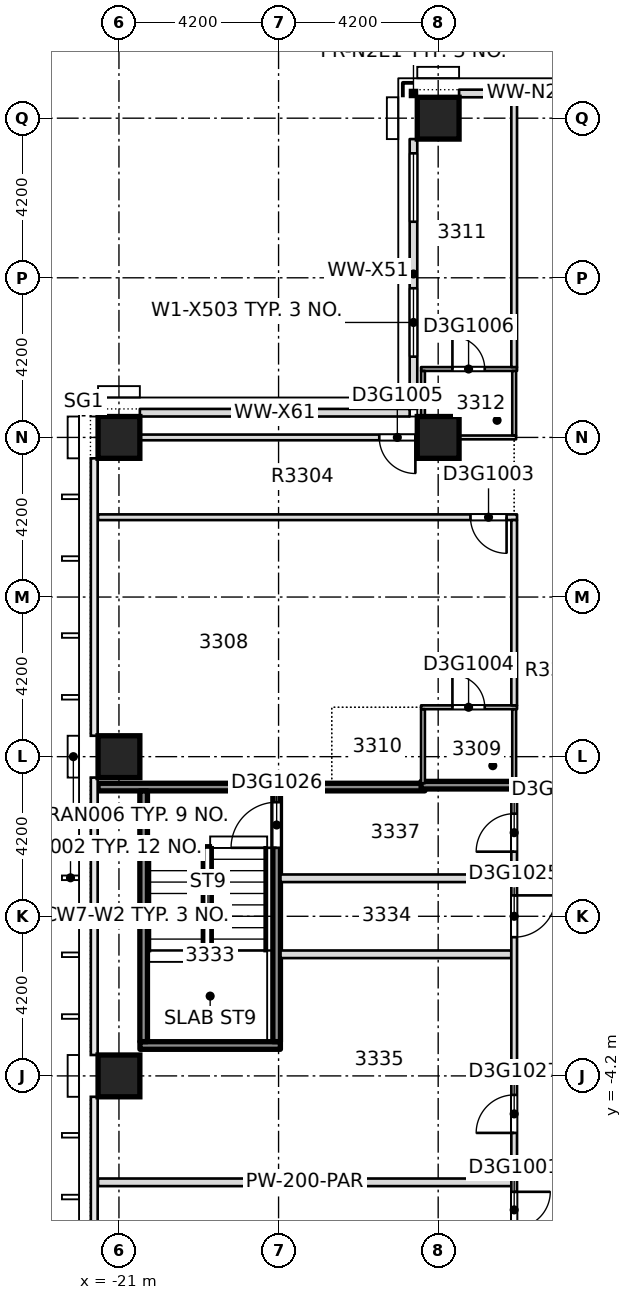
"""IFC4 building model, lengths in metres.
Left out: names, types, materials, properties, quantities, classifications, styles, units other than length and angle.
Written with IfcOpenShell. Run it as: python <this file> out.ifc"""

import sys

from ifc_helpers import new_model, si_unit, direction, frame, frame_2d, origin, origin_2d, place, context, subcontext, project, spatial, rectangle, extrude, element, fill, save


model = new_model("IFC4")
c1 = context("Model", 3, precision=1e-05, world=origin(), true_north=direction((0.0, 1.0)))
c2 = subcontext(c1, "Body", "Model", "MODEL_VIEW")
j1 = project(units=[si_unit("LENGTHUNIT", "METRE"), si_unit("PLANEANGLEUNIT", "RADIAN")], contexts=[c1])
p1 = place(None, origin())
s1 = spatial("IfcSite", under=j1, at=p1, CompositionType="ELEMENT")
p2 = place(p1, origin())
s2 = spatial("IfcBuilding", under=s1, at=p2, CompositionType="ELEMENT")
p3 = place(p2, frame((0.0, 0.0, 133.1)))
s3 = spatial("IfcBuildingStorey", under=s2, at=p3, CompositionType="ELEMENT", Elevation=133.1)
for number, where, z_axis, x_axis in (
    (1, (-21.0, -4.2, -0.4), (0.0, 0.0, 1.0), (1.0, 0.0, 0.0)),
    (2, (-21.0, 4.2, -0.4), (0.0, 0.0, 1.0), (1.0, 0.0, 0.0)),
    (3, (-21.0, 12.6, -0.4), (0.0, 0.0, 1.0), (1.0, 0.0, 0.0)),
    (4, (-12.6, 12.6, -0.4), (0.0, 0.0, 1.0), (1.0, 0.0, 0.0)),
    (5, (-12.6, 21.0, -0.4), (0.0, 0.0, 1.0), (1.0, 0.0, 0.0)),
):
    element("IfcColumn", number, at=place(p3, frame(where, z_axis=z_axis, x_axis=x_axis)), inside=s3, PredefinedType="COLUMN", context=c2, shape_type="SweptSolid", body=[
        extrude(rectangle(XDim=1.1, YDim=1.1, at=origin_2d()), origin(), (0.0, 0.0, 1.0), 3.45),
    ])
p4 = place(p3, frame((-21.55, -7.0, 0.0), z_axis=(0.0, 0.0, 1.0), x_axis=(1.0, 0.0, 0.0)))
e6 = element("IfcWall", 6, at=p4, inside=s3, PredefinedType="PARTITIONING", context=c2, shape_type="SweptSolid", body=[
    extrude(rectangle(XDim=10.875, YDim=0.2, at=frame_2d((5.438, 0.0))), origin(), (0.0, 0.0, 1.0), 3.05),
])
p5 = place(p3, frame((-20.448, -3.4, 0.0), z_axis=(0.0, 0.0, 1.0), x_axis=(1.0, 0.0, 0.0)))
e7 = element("IfcWall", 7, at=p5, inside=s3, PredefinedType="SOLIDWALL", context=c2, shape_type="SweptSolid", body=[
    extrude(rectangle(XDim=3.696, YDim=0.2, at=frame_2d((1.848, 0.0))), origin(), (0.0, 0.0, 1.0), 3.05),
])
p6 = place(p3, frame((-16.748, -1.0, 0.0), z_axis=(0.0, 0.0, 1.0), x_axis=(1.0, 0.0, 0.0)))
e8 = element("IfcWall", 8, at=p6, inside=s3, PredefinedType="PARTITIONING", context=c2, shape_type="SweptSolid", body=[
    extrude(rectangle(XDim=6.071, YDim=0.2, at=frame_2d((3.036, 0.0))), origin(), (0.0, 0.0, 1.0), 3.05),
])
p7 = place(p3, frame((-16.75, 1.0, 0.0), z_axis=(0.0, 0.0, 1.0), x_axis=(1.0, 0.0, 0.0)))
e9 = element("IfcWall", 9, at=p7, inside=s3, PredefinedType="PARTITIONING", context=c2, shape_type="SweptSolid", body=[
    extrude(rectangle(XDim=6.075, YDim=0.2, at=frame_2d((3.038, 0.0))), origin(), (0.0, 0.0, 1.0), 3.05),
])
p8 = place(p3, frame((-21.55, 3.4, 0.0), z_axis=(0.0, 0.0, 1.0), x_axis=(1.0, 0.0, 0.0)))
e10 = element("IfcWall", 10, at=p8, inside=s3, PredefinedType="SOLIDWALL", context=c2, shape_type="SweptSolid", body=[
    extrude(rectangle(XDim=8.6, YDim=0.2, at=frame_2d((4.3, 0.0))), origin(), (0.0, 0.0, 1.0), 3.05),
])
p9 = place(p3, frame((-13.05, 3.45, 0.0), z_axis=(0.0, 0.0, 1.0), x_axis=(1.0, 0.0, 0.0)))
e11 = element("IfcWall", 11, at=p9, inside=s3, PredefinedType="SOLIDWALL", context=c2, shape_type="SweptSolid", body=[
    extrude(rectangle(XDim=2.525, YDim=0.2, at=frame_2d((1.263, 0.0))), origin(), (0.0, 0.0, 1.0), 3.05),
])
p10 = place(p3, frame((-13.05, 5.5, 0.0), z_axis=(0.0, 0.0, 1.0), x_axis=(1.0, 0.0, 0.0)))
e12 = element("IfcWall", 12, at=p10, inside=s3, PredefinedType="PARTITIONING", context=c2, shape_type="SweptSolid", body=[
    extrude(rectangle(XDim=2.525, YDim=0.1, at=frame_2d((1.263, 0.0))), origin(), (0.0, 0.0, 1.0), 3.05),
])
p11 = place(p10, frame((0.825, 0.0, 0.0)))
e13 = element("IfcOpeningElement", 13, at=p11, cuts=e12, PredefinedType="OPENING", context=c2, shape_type="SweptSolid", body=[
    extrude(rectangle(XDim=0.85, YDim=2.1, at=frame_2d((0.425, 1.05))), frame((0.0, 0.06, 0.0), z_axis=(0.0, -1.0, 0.0), x_axis=(1.0, 0.0, 0.0)), (0.0, 0.0, 1.0), 0.12),
])
p12 = place(p3, frame((-21.55, 10.5, 0.0), z_axis=(0.0, 0.0, 1.0), x_axis=(1.0, 0.0, 0.0)))
e14 = element("IfcWall", 14, at=p12, inside=s3, PredefinedType="PARTITIONING", context=c2, shape_type="SweptSolid", body=[
    extrude(rectangle(XDim=11.025, YDim=0.15, at=frame_2d((5.513, 0.0))), origin(), (0.0, 0.0, 1.0), 3.05),
])
p13 = place(p12, frame((9.8, 0.0, 0.0)))
e15 = element("IfcOpeningElement", 15, at=p13, cuts=e14, PredefinedType="OPENING", context=c2, shape_type="SweptSolid", body=[
    extrude(rectangle(XDim=0.95, YDim=2.1, at=frame_2d((0.475, 1.05))), frame((0.0, 0.085, 0.0), z_axis=(0.0, -1.0, 0.0), x_axis=(1.0, 0.0, 0.0)), (0.0, 0.0, 1.0), 0.17),
])
p14 = place(p3, frame((-21.55, 12.6, 0.0), z_axis=(0.0, 0.0, 1.0), x_axis=(1.0, 0.0, 0.0)))
e16 = element("IfcWall", 16, at=p14, inside=s3, PredefinedType="PARTITIONING", context=c2, shape_type="SweptSolid", body=[
    extrude(rectangle(XDim=1.1, YDim=0.15, at=frame_2d((0.55, 0.0))), origin(), (0.0, 0.0, 1.0), 3.05),
])
p15 = place(p3, frame((-13.05, 12.6, 0.0), z_axis=(0.0, 0.0, 1.0), x_axis=(1.0, 0.0, 0.0)))
e17 = element("IfcWall", 17, at=p15, inside=s3, PredefinedType="PARTITIONING", context=c2, shape_type="SweptSolid", body=[
    extrude(rectangle(XDim=2.5, YDim=0.1, at=frame_2d((1.25, 0.0))), origin(), (0.0, 0.0, 1.0), 3.05),
])
p16 = place(p3, frame((-13.05, 14.4, 0.0), z_axis=(0.0, 0.0, 1.0), x_axis=(1.0, 0.0, 0.0)))
e18 = element("IfcWall", 18, at=p16, inside=s3, PredefinedType="PARTITIONING", context=c2, shape_type="SweptSolid", body=[
    extrude(rectangle(XDim=2.525, YDim=0.1, at=frame_2d((1.263, 0.0))), origin(), (0.0, 0.0, 1.0), 3.05),
])
p17 = place(p16, frame((0.825, 0.0, 0.0)))
e19 = element("IfcOpeningElement", 19, at=p17, cuts=e18, PredefinedType="OPENING", context=c2, shape_type="SweptSolid", body=[
    extrude(rectangle(XDim=0.85, YDim=2.1, at=frame_2d((0.425, 1.05))), frame((0.0, 0.06, 0.0), z_axis=(0.0, -1.0, 0.0), x_axis=(1.0, 0.0, 0.0)), (0.0, 0.0, 1.0), 0.12),
])
p18 = place(p3, frame((-20.35, -3.298, 0.0), z_axis=(0.0, 0.0, 1.0), x_axis=(0.0, 1.0, 0.0)))
e20 = element("IfcWall", 20, at=p18, inside=s3, PredefinedType="SOLIDWALL", context=c2, shape_type="SweptSolid", body=[
    extrude(rectangle(XDim=6.596, YDim=0.2, at=frame_2d((3.298, 0.0))), origin(), (0.0, 0.0, 1.0), 3.05),
])
p19 = place(p3, frame((-16.85, -3.298, 0.0), z_axis=(0.0, 0.0, 1.0), x_axis=(0.0, 1.0, 0.0)))
e21 = element("IfcWall", 21, at=p19, inside=s3, PredefinedType="SOLIDWALL", context=c2, shape_type="SweptSolid", body=[
    extrude(rectangle(XDim=6.598, YDim=0.2, at=frame_2d((3.299, 0.0))), origin(), (0.0, 0.0, 1.0), 3.05),
])
p20 = place(p19, frame((5.1, 0.0, 0.0)))
e22 = element("IfcOpeningElement", 22, at=p20, cuts=e21, PredefinedType="OPENING", context=c2, shape_type="SweptSolid", body=[
    extrude(rectangle(XDim=1.2, YDim=2.1, at=frame_2d((0.6, 1.05))), frame((0.0, 0.11, 0.0), z_axis=(0.0, -1.0, 0.0), x_axis=(1.0, 0.0, 0.0)), (0.0, 0.0, 1.0), 0.22),
])
p21 = place(p3, frame((-13.0, 3.5, 0.0), z_axis=(0.0, 0.0, 1.0), x_axis=(0.0, 1.0, 0.0)))
e23 = element("IfcWall", 23, at=p21, inside=s3, PredefinedType="PARTITIONING", context=c2, shape_type="SweptSolid", body=[
    extrude(rectangle(XDim=1.95, YDim=0.1, at=frame_2d((0.975, 0.0))), origin(), (0.0, 0.0, 1.0), 3.05),
])
p22 = place(p3, frame((-13.0, 12.675, 0.0), z_axis=(0.0, 0.0, 1.0), x_axis=(0.0, 1.0, 0.0)))
e24 = element("IfcWall", 24, at=p22, inside=s3, PredefinedType="PARTITIONING", context=c2, shape_type="SweptSolid", body=[
    extrude(rectangle(XDim=1.675, YDim=0.1, at=frame_2d((0.837, 0.0))), origin(), (0.0, 0.0, 1.0), 3.05),
])
p23 = place(p3, frame((-10.6, -10.525, 0.0), z_axis=(0.0, 0.0, 1.0), x_axis=(0.0, 1.0, 0.0)))
e25 = element("IfcWall", 25, at=p23, inside=s3, PredefinedType="PARTITIONING", context=c2, shape_type="SweptSolid", body=[
    extrude(rectangle(XDim=13.875, YDim=0.15, at=frame_2d((6.938, 0.0))), origin(), (0.0, 0.0, 1.0), 3.05),
])
p24 = place(p23, frame((2.325, 0.0, 0.0)))
e26 = element("IfcOpeningElement", 26, at=p24, cuts=e25, PredefinedType="OPENING", context=c2, shape_type="SweptSolid", body=[
    extrude(rectangle(XDim=0.95, YDim=2.1, at=frame_2d((0.475, 1.05))), frame((0.0, 0.085, 0.0), z_axis=(0.0, -1.0, 0.0), x_axis=(1.0, 0.0, 0.0)), (0.0, 0.0, 1.0), 0.17),
])
p25 = place(p23, frame((9.975, 0.0, 0.0)))
e27 = element("IfcOpeningElement", 27, at=p25, cuts=e25, PredefinedType="OPENING", context=c2, shape_type="SweptSolid", body=[
    extrude(rectangle(XDim=1.1, YDim=2.1, at=frame_2d((0.55, 1.05))), frame((0.0, 0.085, 0.0), z_axis=(0.0, -1.0, 0.0), x_axis=(1.0, 0.0, 0.0)), (0.0, 0.0, 1.0), 0.17),
])
p26 = place(p23, frame((4.825, 0.0, 0.0)))
e28 = element("IfcOpeningElement", 28, at=p26, cuts=e25, PredefinedType="OPENING", context=c2, shape_type="SweptSolid", body=[
    extrude(rectangle(XDim=1.0, YDim=2.1, at=frame_2d((0.5, 1.05))), frame((0.0, 0.085, 0.0), z_axis=(0.0, -1.0, 0.0), x_axis=(1.0, 0.0, 0.0)), (0.0, 0.0, 1.0), 0.17),
])
p27 = place(p23, frame((12.225, 0.0, 0.0)))
e29 = element("IfcOpeningElement", 29, at=p27, cuts=e25, PredefinedType="OPENING", context=c2, shape_type="SweptSolid", body=[
    extrude(rectangle(XDim=1.0, YDim=2.1, at=frame_2d((0.5, 1.05))), frame((0.0, 0.085, 0.0), z_axis=(0.0, -1.0, 0.0), x_axis=(1.0, 0.0, 0.0)), (0.0, 0.0, 1.0), 0.17),
])
p28 = place(p3, frame((-10.6, 3.45, 0.0), z_axis=(0.0, 0.0, 1.0), x_axis=(0.0, 1.0, 0.0)))
e30 = element("IfcWall", 30, at=p28, inside=s3, PredefinedType="PARTITIONING", context=c2, shape_type="SweptSolid", body=[
    extrude(rectangle(XDim=2.0, YDim=0.1, at=frame_2d((1.0, 0.0))), origin(), (0.0, 0.0, 1.0), 3.05),
])
p29 = place(p3, frame((-10.6, 5.55, 0.0), z_axis=(0.0, 0.0, 1.0), x_axis=(0.0, 1.0, 0.0)))
e31 = element("IfcWall", 31, at=p29, inside=s3, PredefinedType="PARTITIONING", context=c2, shape_type="SweptSolid", body=[
    extrude(rectangle(XDim=4.875, YDim=0.15, at=frame_2d((2.438, 0.0))), origin(), (0.0, 0.0, 1.0), 3.05),
])
p30 = place(p3, frame((-10.6, 12.65, 0.0), z_axis=(0.0, 0.0, 1.0), x_axis=(0.0, 1.0, 0.0)))
e32 = element("IfcWall", 32, at=p30, inside=s3, PredefinedType="PARTITIONING", context=c2, shape_type="SweptSolid", body=[
    extrude(rectangle(XDim=1.7, YDim=0.1, at=frame_2d((0.85, 0.0))), origin(), (0.0, 0.0, 1.0), 3.05),
])
p31 = place(p3, frame((-10.6, 14.45, 0.0), z_axis=(0.0, 0.0, 1.0), x_axis=(0.0, 1.0, 0.0)))
e33 = element("IfcWall", 33, at=p31, inside=s3, PredefinedType="PARTITIONING", context=c2, shape_type="SweptSolid", body=[
    extrude(rectangle(XDim=7.1, YDim=0.15, at=frame_2d((3.55, 0.0))), origin(), (0.0, 0.0, 1.0), 3.05),
])
p32 = place(p3, frame((-8.4, 21.65, 0.0), z_axis=(0.0, 0.0, 1.0), x_axis=(-1.0, 0.0, 0.0)))
e34 = element("IfcWall", 34, at=p32, inside=s3, PredefinedType="STANDARD", context=c2, shape_type="SweptSolid", body=[
    extrude(rectangle(XDim=3.65, YDim=0.2, at=frame_2d((1.825, 0.0))), origin(), (0.0, 0.0, 1.0), 3.05),
])
p33 = place(p32, frame((0.375, 0.0, 0.2)))
e35 = element("IfcOpeningElement", 35, at=p33, cuts=e34, PredefinedType="OPENING", context=c2, shape_type="SweptSolid", body=[
    extrude(rectangle(XDim=1.8, YDim=2.65, at=frame_2d((0.9, 1.325))), frame((0.0, 0.11, 0.0), z_axis=(0.0, -1.0, 0.0), x_axis=(1.0, 0.0, 0.0)), (0.0, 0.0, 1.0), 0.22),
])
p34 = place(p3, frame((-13.25, 20.45, 0.0), z_axis=(0.0, 0.0, 1.0), x_axis=(0.0, -1.0, 0.0)))
e36 = element("IfcWall", 36, at=p34, inside=s3, PredefinedType="STANDARD", context=c2, shape_type="SweptSolid", body=[
    extrude(rectangle(XDim=7.1, YDim=0.2, at=frame_2d((3.55, 0.0))), origin(), (0.0, 0.0, 1.0), 3.05),
])
p35 = place(p34, frame((3.925, 0.0, 0.2)))
e37 = element("IfcOpeningElement", 37, at=p35, cuts=e36, PredefinedType="OPENING", context=c2, shape_type="SweptSolid", body=[
    extrude(rectangle(XDim=1.8, YDim=2.65, at=frame_2d((0.9, 1.325))), frame((0.0, 0.11, 0.0), z_axis=(0.0, -1.0, 0.0), x_axis=(1.0, 0.0, 0.0)), (0.0, 0.0, 1.0), 0.22),
])
p36 = place(p34, frame((0.375, 0.0, 0.2)))
e38 = element("IfcOpeningElement", 38, at=p36, cuts=e36, PredefinedType="OPENING", context=c2, shape_type="SweptSolid", body=[
    extrude(rectangle(XDim=1.8, YDim=2.65, at=frame_2d((0.9, 1.325))), frame((0.0, 0.11, 0.0), z_axis=(0.0, -1.0, 0.0), x_axis=(1.0, 0.0, 0.0)), (0.0, 0.0, 1.0), 0.22),
])
p37 = place(p3, frame((-13.35, 13.25, 0.0), z_axis=(0.0, 0.0, 1.0), x_axis=(-1.0, 0.0, 0.0)))
e39 = element("IfcWall", 39, at=p37, inside=s3, PredefinedType="STANDARD", context=c2, shape_type="SweptSolid", body=[
    extrude(rectangle(XDim=7.1, YDim=0.2, at=frame_2d((3.55, 0.0))), origin(), (0.0, 0.0, 1.0), 3.05),
])
p38 = place(p3, frame((-20.45, 12.6, 0.0), z_axis=(0.0, 0.0, 1.0), x_axis=(1.0, 0.0, 0.0)))
e40 = element("IfcWall", 40, at=p38, inside=s3, PredefinedType="PARTITIONING", context=c2, shape_type="SweptSolid", body=[
    extrude(rectangle(XDim=7.3, YDim=0.15, at=frame_2d((3.65, 0.0))), origin(), (0.0, 0.0, 1.0), 2.5),
])
p39 = place(p38, frame((6.3, 0.0, 0.0)))
e41 = element("IfcOpeningElement", 41, at=p39, cuts=e40, PredefinedType="OPENING", context=c2, shape_type="SweptSolid", body=[
    extrude(rectangle(XDim=0.95, YDim=2.1, at=frame_2d((0.475, 1.05))), frame((0.0, 0.085, 0.0), z_axis=(0.0, -1.0, 0.0), x_axis=(1.0, 0.0, 0.0)), (0.0, 0.0, 1.0), 0.17),
])
p40 = place(p3, frame((-13.15, 12.6, 0.0), z_axis=(0.0, 0.0, 1.0), x_axis=(1.0, 0.0, 0.0)))
e42 = element("IfcWall", 42, at=p40, inside=s3, PredefinedType="PARTITIONING", context=c2, shape_type="SweptSolid", body=[
    extrude(rectangle(XDim=0.2, YDim=0.15, at=frame_2d((0.1, 0.0))), origin(), (0.0, 0.0, 1.0), 3.05),
])
p41 = place(p24, origin())
e43 = element("IfcDoor", 43, at=p41, inside=s3, OperationType="SINGLE_SWING_RIGHT", PredefinedType="DOOR", context=c2, shape_type="SweptSolid", body=[
    extrude(rectangle(XDim=0.95, YDim=2.1, at=frame_2d((0.475, 1.05))), frame((0.0, 0.025, 0.0), z_axis=(0.0, -1.0, 0.0), x_axis=(1.0, 0.0, 0.0)), (0.0, 0.0, 1.0), 0.05),
])
fill(e26, e43)
p42 = place(p13, origin())
e44 = element("IfcDoor", 44, at=p42, inside=s3, OperationType="SINGLE_SWING_RIGHT", PredefinedType="DOOR", context=c2, shape_type="SweptSolid", body=[
    extrude(rectangle(XDim=0.95, YDim=2.1, at=frame_2d((0.475, 1.05))), frame((0.0, 0.025, 0.0), z_axis=(0.0, -1.0, 0.0), x_axis=(1.0, 0.0, 0.0)), (0.0, 0.0, 1.0), 0.05),
])
fill(e15, e44)
p43 = place(p11, origin())
e45 = element("IfcDoor", 45, at=p43, inside=s3, OperationType="SINGLE_SWING_RIGHT", PredefinedType="DOOR", context=c2, shape_type="SweptSolid", body=[
    extrude(rectangle(XDim=0.85, YDim=2.1, at=frame_2d((0.425, 1.05))), frame((0.0, 0.025, 0.0), z_axis=(0.0, -1.0, 0.0), x_axis=(1.0, 0.0, 0.0)), (0.0, 0.0, 1.0), 0.05),
])
fill(e13, e45)
p44 = place(p39, origin())
e46 = element("IfcDoor", 46, at=p44, inside=s3, OperationType="SINGLE_SWING_LEFT", PredefinedType="DOOR", context=c2, shape_type="SweptSolid", body=[
    extrude(rectangle(XDim=0.95, YDim=2.1, at=frame_2d((0.475, 1.05))), frame((0.0, 0.025, 0.0), z_axis=(0.0, -1.0, 0.0), x_axis=(1.0, 0.0, 0.0)), (0.0, 0.0, 1.0), 0.05),
])
fill(e41, e46)
p45 = place(p17, origin())
e47 = element("IfcDoor", 47, at=p45, inside=s3, OperationType="SINGLE_SWING_RIGHT", PredefinedType="DOOR", context=c2, shape_type="SweptSolid", body=[
    extrude(rectangle(XDim=0.85, YDim=2.1, at=frame_2d((0.425, 1.05))), frame((0.0, 0.025, 0.0), z_axis=(0.0, -1.0, 0.0), x_axis=(1.0, 0.0, 0.0)), (0.0, 0.0, 1.0), 0.05),
])
fill(e19, e47)
p46 = place(p25, origin())
e48 = element("IfcDoor", 48, at=p46, inside=s3, OperationType="SINGLE_SWING_RIGHT", PredefinedType="DOOR", context=c2, shape_type="SweptSolid", body=[
    extrude(rectangle(XDim=1.1, YDim=2.1, at=frame_2d((0.55, 1.05))), frame((0.0, 0.025, 0.0), z_axis=(0.0, -1.0, 0.0), x_axis=(1.0, 0.0, 0.0)), (0.0, 0.0, 1.0), 0.05),
])
fill(e27, e48)
p47 = place(p20, origin())
e49 = element("IfcDoor", 49, at=p47, inside=s3, OperationType="SINGLE_SWING_RIGHT", PredefinedType="DOOR", context=c2, shape_type="SweptSolid", body=[
    extrude(rectangle(XDim=1.2, YDim=2.1, at=frame_2d((0.6, 1.05))), frame((0.0, 0.025, 0.0), z_axis=(0.0, -1.0, 0.0), x_axis=(1.0, 0.0, 0.0)), (0.0, 0.0, 1.0), 0.05),
])
fill(e22, e49)
p48 = place(p26, origin())
e50 = element("IfcDoor", 50, at=p48, inside=s3, OperationType="SINGLE_SWING_RIGHT", PredefinedType="DOOR", context=c2, shape_type="SweptSolid", body=[
    extrude(rectangle(XDim=1.0, YDim=2.1, at=frame_2d((0.5, 1.05))), frame((0.0, 0.025, 0.0), z_axis=(0.0, -1.0, 0.0), x_axis=(1.0, 0.0, 0.0)), (0.0, 0.0, 1.0), 0.05),
])
fill(e28, e50)
p49 = place(p27, origin())
e51 = element("IfcDoor", 51, at=p49, inside=s3, OperationType="SINGLE_SWING_RIGHT", PredefinedType="DOOR", context=c2, shape_type="SweptSolid", body=[
    extrude(rectangle(XDim=1.0, YDim=2.1, at=frame_2d((0.5, 1.05))), frame((0.0, 0.025, 0.0), z_axis=(0.0, -1.0, 0.0), x_axis=(1.0, 0.0, 0.0)), (0.0, 0.0, 1.0), 0.05),
])
fill(e29, e51)
p50 = place(p33, origin())
e52 = element("IfcWindow", 52, at=p50, inside=s3, PartitioningType="SINGLE_PANEL", PredefinedType="WINDOW", context=c2, shape_type="SweptSolid", body=[
    extrude(rectangle(XDim=1.8, YDim=2.65, at=frame_2d((0.9, 1.325))), frame((0.0, 0.03, 0.0), z_axis=(0.0, -1.0, 0.0), x_axis=(1.0, 0.0, 0.0)), (0.0, 0.0, 1.0), 0.06),
])
fill(e35, e52)
p51 = place(p35, origin())
e53 = element("IfcWindow", 53, at=p51, inside=s3, PartitioningType="SINGLE_PANEL", PredefinedType="WINDOW", context=c2, shape_type="SweptSolid", body=[
    extrude(rectangle(XDim=1.8, YDim=2.65, at=frame_2d((0.9, 1.325))), frame((0.0, 0.03, 0.0), z_axis=(0.0, -1.0, 0.0), x_axis=(1.0, 0.0, 0.0)), (0.0, 0.0, 1.0), 0.06),
])
fill(e37, e53)
p52 = place(p36, origin())
e54 = element("IfcWindow", 54, at=p52, inside=s3, PartitioningType="SINGLE_PANEL", PredefinedType="WINDOW", context=c2, shape_type="SweptSolid", body=[
    extrude(rectangle(XDim=1.8, YDim=2.65, at=frame_2d((0.9, 1.325))), frame((0.0, 0.03, 0.0), z_axis=(0.0, -1.0, 0.0), x_axis=(1.0, 0.0, 0.0)), (0.0, 0.0, 1.0), 0.06),
])
fill(e38, e54)
save(model, sys.argv[1])
